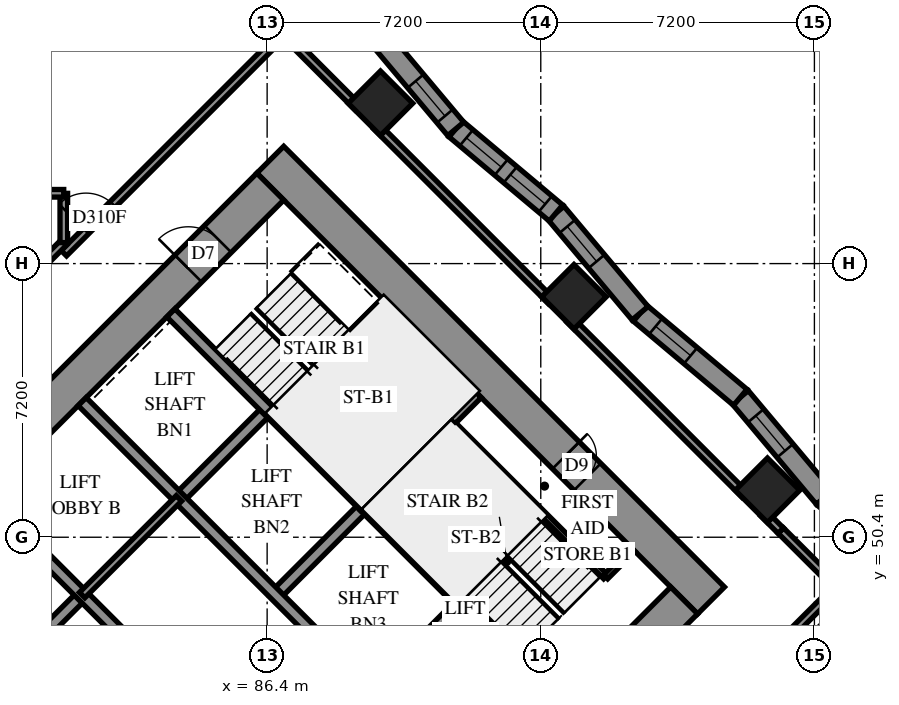
"""IFC4 building model, lengths in metres.
Left out: names, types, materials, properties, quantities, classifications, styles, units other than length and angle.
Written with IfcOpenShell. Run it as: python <this file> out.ifc"""

import sys

from ifc_helpers import new_model, si_unit, direction, frame, frame_2d, origin, origin_2d, place, context, subcontext, project, spatial, polyline, rectangle, outline, extrude, element, fill, save


model = new_model("IFC4")
c1 = context("Model", 3, precision=1e-05, world=origin(), true_north=direction((0.0, 1.0)))
c2 = subcontext(c1, "Body", "Model", "MODEL_VIEW")
j1 = project(units=[si_unit("LENGTHUNIT", "METRE"), si_unit("PLANEANGLEUNIT", "RADIAN")], contexts=[c1])
p1 = place(None, origin())
s1 = spatial("IfcSite", under=j1, at=p1, CompositionType="ELEMENT")
p2 = place(p1, origin())
s2 = spatial("IfcBuilding", under=s1, at=p2, CompositionType="ELEMENT")
p3 = place(p2, frame((0.0, 0.0, 27.0)))
s3 = spatial("IfcBuildingStorey", under=s2, at=p3, CompositionType="ELEMENT", Elevation=27.0)
for number, where, z_axis, x_axis in (
    (1, (89.382, 61.818, 0.0), (0.0, 0.0, 1.0), (0.707, -0.707, 0.0)),
    (2, (94.474, 56.727, 0.0), (0.0, 0.0, 1.0), (0.707, -0.707, 0.0)),
    (3, (99.565, 51.635, 0.0), (0.0, 0.0, 1.0), (0.707, -0.707, 0.0)),
):
    element("IfcColumn", number, at=place(p3, frame(where, z_axis=z_axis, x_axis=x_axis)), inside=s3, PredefinedType="COLUMN", context=c2, shape_type="SweptSolid", body=[
        extrude(rectangle(XDim=1.2, YDim=1.2, at=origin_2d()), origin(), (0.0, 0.0, 1.0), 3.1),
    ])
p4 = place(p3, frame((75.594, 49.443, -0.3), z_axis=(0.0, 0.0, 1.0), x_axis=(0.7071037324, -0.70710983, 0.0)))
e4 = element("IfcWall", 4, at=p4, inside=s3, PredefinedType="SHEAR", context=c2, shape_type="SweptSolid", body=[
    extrude(rectangle(XDim=16.4, YDim=1.0, at=frame_2d((8.2, 0.0))), origin(), (0.0, 0.0, 1.0), 2.7),
])
p5 = place(p3, frame((86.483, 60.333, -0.3), z_axis=(0.0, 0.0, 1.0), x_axis=(0.70710983, -0.7071037324, 0.0)))
e5 = element("IfcWall", 5, at=p5, inside=s3, PredefinedType="SHEAR", context=c2, shape_type="SweptSolid", body=[
    extrude(rectangle(XDim=16.4, YDim=1.0, at=frame_2d((8.2, 0.0))), origin(), (0.0, 0.0, 1.0), 2.7),
])
p6 = place(p5, frame((11.0, 0.0, 0.3)))
e6 = element("IfcOpeningElement", 6, at=p6, cuts=e5, PredefinedType="OPENING", context=c2, shape_type="SweptSolid", body=[
    extrude(rectangle(XDim=0.8, YDim=2.1, at=frame_2d((0.4, 1.05))), frame((0.0, 0.51, 0.0), z_axis=(0.0, -1.0, 0.0), x_axis=(1.0, 0.0, 0.0)), (0.0, 0.0, 1.0), 1.02),
])
p7 = place(p3, frame((76.301, 49.443, -0.3), z_axis=(0.0, 0.0, 1.0), x_axis=(0.7071067812, 0.7071067812, 0.0)))
e7 = element("IfcWall", 7, at=p7, inside=s3, PredefinedType="SHEAR", context=c2, shape_type="SweptSolid", body=[
    extrude(rectangle(XDim=14.4, YDim=1.0, at=frame_2d((7.2, 0.0))), origin(), (0.0, 0.0, 1.0), 2.7),
])
p8 = place(p7, frame((4.55, 0.0, 0.3)))
e8 = element("IfcOpeningElement", 8, at=p8, cuts=e7, PredefinedType="OPENING", context=c2, shape_type="SweptSolid", body=[
    extrude(rectangle(XDim=1.1, YDim=2.1, at=frame_2d((0.55, 1.05))), frame((0.0, 0.51, 0.0), z_axis=(0.0, -1.0, 0.0), x_axis=(1.0, 0.0, 0.0)), (0.0, 0.0, 1.0), 1.02),
])
p9 = place(p7, frame((11.35, 0.0, 0.3)))
e9 = element("IfcOpeningElement", 9, at=p9, cuts=e7, PredefinedType="OPENING", context=c2, shape_type="SweptSolid", body=[
    extrude(rectangle(XDim=1.1, YDim=2.1, at=frame_2d((0.55, 1.05))), frame((0.0, 0.51, 0.0), z_axis=(0.0, -1.0, 0.0), x_axis=(1.0, 0.0, 0.0)), (0.0, 0.0, 1.0), 1.02),
])
p10 = place(p3, frame((87.19, 38.554, -0.3), z_axis=(0.0, 0.0, 1.0), x_axis=(0.707103309, 0.7071102534, 0.0)))
e10 = element("IfcWall", 10, at=p10, inside=s3, PredefinedType="SHEAR", context=c2, shape_type="SweptSolid", body=[
    extrude(rectangle(XDim=14.4, YDim=1.0, at=frame_2d((7.2, 0.0))), origin(), (0.0, 0.0, 1.0), 2.7),
])
p11 = place(p10, frame((4.55, 0.0, 0.3)))
e11 = element("IfcOpeningElement", 11, at=p11, cuts=e10, PredefinedType="OPENING", context=c2, shape_type="SweptSolid", body=[
    extrude(rectangle(XDim=1.1, YDim=2.1, at=frame_2d((0.55, 1.05))), frame((0.0, 0.51, 0.0), z_axis=(0.0, -1.0, 0.0), x_axis=(1.0, 0.0, 0.0)), (0.0, 0.0, 1.0), 1.02),
])
p12 = place(p10, frame((11.35, 0.0, 0.3)))
e12 = element("IfcOpeningElement", 12, at=p12, cuts=e10, PredefinedType="OPENING", context=c2, shape_type="SweptSolid", body=[
    extrude(rectangle(XDim=1.1, YDim=2.1, at=frame_2d((0.55, 1.05))), frame((0.0, 0.51, 0.0), z_axis=(0.0, -1.0, 0.0), x_axis=(1.0, 0.0, 0.0)), (0.0, 0.0, 1.0), 1.02),
])
for number, where, z_axis, x_axis in (
    (13, (79.2, 46.544, 0.0), (0.0, 0.0, 1.0), (0.707, 0.707, 0.0)),
    (14, (84.079, 51.423, 0.0), (0.0, 0.0, 1.0), (0.707, 0.707, 0.0)),
):
    element("IfcWall", number, at=place(p3, frame(where, z_axis=z_axis, x_axis=x_axis)), inside=s3, PredefinedType="SOLIDWALL", context=c2, shape_type="SweptSolid", body=[
        extrude(rectangle(XDim=3.3, YDim=0.3, at=frame_2d((1.65, 0.0))), origin(), (0.0, 0.0, 1.0), 3.1),
    ])
for number, where, z_axis, x_axis in (
    (15, (86.625, 48.878, 0.0), (0.0, 0.0, 1.0), (0.707, 0.707, 0.0)),
    (16, (89.17, 46.332, 0.0), (0.0, 0.0, 1.0), (0.707, 0.707, 0.0)),
):
    element("IfcWall", number, at=place(p3, frame(where, z_axis=z_axis, x_axis=x_axis)), inside=s3, PredefinedType="SOLIDWALL", context=c2, shape_type="SweptSolid", body=[
        extrude(rectangle(XDim=3.3, YDim=0.3, at=frame_2d((1.65, 0.0))), origin(), (0.0, 0.0, 1.0), 3.1),
    ])
p13 = place(p3, frame((78.988, 51.423, 0.0), z_axis=(0.0, 0.0, 1.0), x_axis=(0.7071067812, -0.7071067812, 0.0)))
e17 = element("IfcWall", 17, at=p13, inside=s3, PredefinedType="SOLIDWALL", context=c2, shape_type="SweptSolid", body=[
    extrude(rectangle(XDim=14.4, YDim=0.3, at=frame_2d((7.2, 0.0))), origin(), (0.0, 0.0, 1.0), 3.1),
])
p14 = place(p13, frame((1.25, 0.0, 0.0)))
e18 = element("IfcOpeningElement", 18, at=p14, cuts=e17, PredefinedType="OPENING", context=c2, shape_type="SweptSolid", body=[
    extrude(rectangle(XDim=1.1, YDim=2.1, at=frame_2d((0.55, 1.05))), frame((0.0, 0.16, 0.0), z_axis=(0.0, -1.0, 0.0), x_axis=(1.0, 0.0, 0.0)), (0.0, 0.0, 1.0), 0.32),
])
p15 = place(p13, frame((4.85, 0.0, 0.0)))
e19 = element("IfcOpeningElement", 19, at=p15, cuts=e17, PredefinedType="OPENING", context=c2, shape_type="SweptSolid", body=[
    extrude(rectangle(XDim=1.1, YDim=2.1, at=frame_2d((0.55, 1.05))), frame((0.0, 0.16, 0.0), z_axis=(0.0, -1.0, 0.0), x_axis=(1.0, 0.0, 0.0)), (0.0, 0.0, 1.0), 0.32),
])
p16 = place(p13, frame((8.45, 0.0, 0.0)))
e20 = element("IfcOpeningElement", 20, at=p16, cuts=e17, PredefinedType="OPENING", context=c2, shape_type="SweptSolid", body=[
    extrude(rectangle(XDim=1.1, YDim=2.1, at=frame_2d((0.55, 1.05))), frame((0.0, 0.16, 0.0), z_axis=(0.0, -1.0, 0.0), x_axis=(1.0, 0.0, 0.0)), (0.0, 0.0, 1.0), 0.32),
])
p17 = place(p13, frame((12.05, 0.0, 0.0)))
e21 = element("IfcOpeningElement", 21, at=p17, cuts=e17, PredefinedType="OPENING", context=c2, shape_type="SweptSolid", body=[
    extrude(rectangle(XDim=1.1, YDim=2.1, at=frame_2d((0.55, 1.05))), frame((0.0, 0.16, 0.0), z_axis=(0.0, -1.0, 0.0), x_axis=(1.0, 0.0, 0.0)), (0.0, 0.0, 1.0), 0.32),
])
p18 = place(p3, frame((81.534, 53.969, 0.0), z_axis=(0.0, 0.0, 1.0), x_axis=(0.707103309, -0.7071102534, 0.0)))
e22 = element("IfcWall", 22, at=p18, inside=s3, PredefinedType="SOLIDWALL", context=c2, shape_type="SweptSolid", body=[
    extrude(rectangle(XDim=14.4, YDim=0.3, at=frame_2d((7.2, 0.0))), origin(), (0.0, 0.0, 1.0), 3.1),
])
p19 = place(p18, frame((12.05, 0.0, 0.0)))
e23 = element("IfcOpeningElement", 23, at=p19, cuts=e22, PredefinedType="OPENING", context=c2, shape_type="SweptSolid", body=[
    extrude(rectangle(XDim=1.1, YDim=2.1, at=frame_2d((0.55, 1.05))), frame((0.0, 0.16, 0.0), z_axis=(0.0, -1.0, 0.0), x_axis=(1.0, 0.0, 0.0)), (0.0, 0.0, 1.0), 0.32),
])
for number, where, z_axis, x_axis in (
    (24, (83.867, 56.302, 0.0), (0.0, 0.0, 1.0), (0.707, -0.707, 0.0)),
    (25, (88.958, 51.211, 0.0), (0.0, 0.0, 1.0), (0.707, -0.707, 0.0)),
):
    element("IfcWall", number, at=place(p3, frame(where, z_axis=z_axis, x_axis=x_axis)), inside=s3, PredefinedType="SOLIDWALL", context=c2, shape_type="SweptSolid", body=[
        extrude(rectangle(XDim=7.2, YDim=0.3, at=frame_2d((3.6, 0.0))), origin(), (0.0, 0.0, 1.0), 3.1),
    ])
p20 = place(p3, frame((88.958, 51.211, 0.0), z_axis=(0.0, 0.0, 1.0), x_axis=(0.7071067812, 0.7071067812, 0.0)))
e26 = element("IfcWall", 26, at=p20, inside=s3, PredefinedType="SOLIDWALL", context=c2, shape_type="SweptSolid", body=[
    extrude(rectangle(XDim=4.2, YDim=0.3, at=frame_2d((2.1, 0.0))), origin(), (0.0, 0.0, 1.0), 3.1),
])
p21 = place(p3, frame((103.7, 49.231, 0.0), z_axis=(0.0, 0.0, 1.0), x_axis=(-0.7660429609, 0.6427893761, 0.0)))
e27 = element("IfcWall", 27, at=p21, inside=s3, PredefinedType="SOLIDWALL", context=c2, shape_type="SweptSolid", body=[
    extrude(outline(polyline([(-0.024, -0.275), (3.418, -0.275), (3.466, 0.275), (0.024, 0.275), (-0.024, -0.275)])), origin(), (0.0, 0.0, 1.0), 3.1),
])
p22 = place(p21, frame((1.535, 0.0, 0.5)))
e28 = element("IfcOpeningElement", 28, at=p22, cuts=e27, PredefinedType="OPENING", context=c2, shape_type="SweptSolid", body=[
    extrude(rectangle(XDim=1.2, YDim=2.45, at=frame_2d((0.6, 1.225))), frame((0.0, 0.285, 0.0), z_axis=(0.0, -1.0, 0.0), x_axis=(1.0, 0.0, 0.0)), (0.0, 0.0, 1.0), 0.57),
])
p23 = place(p3, frame((101.063, 51.444, 0.0), z_axis=(0.0, 0.0, 1.0), x_axis=(-0.6428036801, 0.7660309582, 0.0)))
e29 = element("IfcWall", 29, at=p23, inside=s3, PredefinedType="SOLIDWALL", context=c2, shape_type="SweptSolid", body=[
    extrude(outline(polyline([(0.024, -0.275), (3.466, -0.275), (3.418, 0.275), (-0.024, 0.275), (0.024, -0.275)])), origin(), (0.0, 0.0, 1.0), 3.1),
])
p24 = place(p23, frame((1.609, 0.0, 0.5)))
e30 = element("IfcOpeningElement", 30, at=p24, cuts=e29, PredefinedType="OPENING", context=c2, shape_type="SweptSolid", body=[
    extrude(rectangle(XDim=1.2, YDim=2.45, at=frame_2d((0.6, 1.225))), frame((0.0, 0.285, 0.0), z_axis=(0.0, -1.0, 0.0), x_axis=(1.0, 0.0, 0.0)), (0.0, 0.0, 1.0), 0.57),
])
p25 = place(p3, frame((98.85, 54.081, 0.0), z_axis=(0.0, 0.0, 1.0), x_axis=(-0.7660309582, 0.6428036801, 0.0)))
e31 = element("IfcWall", 31, at=p25, inside=s3, PredefinedType="SOLIDWALL", context=c2, shape_type="SweptSolid", body=[
    extrude(outline(polyline([(-0.024, -0.275), (3.418, -0.275), (3.466, 0.275), (0.024, 0.275), (-0.024, -0.275)])), origin(), (0.0, 0.0, 1.0), 3.1),
])
p26 = place(p25, frame((1.706, 0.0, 0.5)))
e32 = element("IfcOpeningElement", 32, at=p26, cuts=e31, PredefinedType="OPENING", context=c2, shape_type="SweptSolid", body=[
    extrude(rectangle(XDim=1.2, YDim=2.45, at=frame_2d((0.6, 1.225))), frame((0.0, 0.285, 0.0), z_axis=(0.0, -1.0, 0.0), x_axis=(1.0, 0.0, 0.0)), (0.0, 0.0, 1.0), 0.57),
])
p27 = place(p3, frame((96.213, 56.294, 0.0), z_axis=(0.0, 0.0, 1.0), x_axis=(-0.6427893761, 0.7660429609, 0.0)))
e33 = element("IfcWall", 33, at=p27, inside=s3, PredefinedType="SOLIDWALL", context=c2, shape_type="SweptSolid", body=[
    extrude(outline(polyline([(0.024, -0.275), (3.466, -0.275), (3.418, 0.275), (-0.024, 0.275), (0.024, -0.275)])), origin(), (0.0, 0.0, 1.0), 3.1),
])
p28 = place(p27, frame((1.78, 0.0, 0.5)))
e34 = element("IfcOpeningElement", 34, at=p28, cuts=e33, PredefinedType="OPENING", context=c2, shape_type="SweptSolid", body=[
    extrude(rectangle(XDim=1.2, YDim=2.45, at=frame_2d((0.6, 1.225))), frame((0.0, 0.285, 0.0), z_axis=(0.0, -1.0, 0.0), x_axis=(1.0, 0.0, 0.0)), (0.0, 0.0, 1.0), 0.57),
])
p29 = place(p3, frame((94.0, 58.931, 0.0), z_axis=(0.0, 0.0, 1.0), x_axis=(-0.7660429609, 0.6427893761, 0.0)))
e35 = element("IfcWall", 35, at=p29, inside=s3, PredefinedType="SOLIDWALL", context=c2, shape_type="SweptSolid", body=[
    extrude(outline(polyline([(-0.024, -0.275), (3.418, -0.275), (3.466, 0.275), (0.024, 0.275), (-0.024, -0.275)])), origin(), (0.0, 0.0, 1.0), 3.1),
])
p30 = place(p29, frame((0.368, 0.0, 0.5)))
e36 = element("IfcOpeningElement", 36, at=p30, cuts=e35, PredefinedType="OPENING", context=c2, shape_type="SweptSolid", body=[
    extrude(rectangle(XDim=1.2, YDim=2.45, at=frame_2d((0.6, 1.225))), frame((0.0, 0.285, 0.0), z_axis=(0.0, -1.0, 0.0), x_axis=(1.0, 0.0, 0.0)), (0.0, 0.0, 1.0), 0.57),
])
p31 = place(p29, frame((1.878, 0.0, 0.5)))
e37 = element("IfcOpeningElement", 37, at=p31, cuts=e35, PredefinedType="OPENING", context=c2, shape_type="SweptSolid", body=[
    extrude(rectangle(XDim=1.2, YDim=2.45, at=frame_2d((0.6, 1.225))), frame((0.0, 0.285, 0.0), z_axis=(0.0, -1.0, 0.0), x_axis=(1.0, 0.0, 0.0)), (0.0, 0.0, 1.0), 0.57),
])
p32 = place(p3, frame((91.363, 61.144, 0.0), z_axis=(0.0, 0.0, 1.0), x_axis=(-0.6428036801, 0.7660309582, 0.0)))
e38 = element("IfcWall", 38, at=p32, inside=s3, PredefinedType="SOLIDWALL", context=c2, shape_type="SweptSolid", body=[
    extrude(outline(polyline([(0.024, -0.275), (3.466, -0.275), (3.418, 0.275), (-0.024, 0.275), (0.024, -0.275)])), origin(), (0.0, 0.0, 1.0), 3.1),
])
p33 = place(p32, frame((0.442, 0.0, 0.5)))
e39 = element("IfcOpeningElement", 39, at=p33, cuts=e38, PredefinedType="OPENING", context=c2, shape_type="SweptSolid", body=[
    extrude(rectangle(XDim=1.2, YDim=2.45, at=frame_2d((0.6, 1.225))), frame((0.0, 0.285, 0.0), z_axis=(0.0, -1.0, 0.0), x_axis=(1.0, 0.0, 0.0)), (0.0, 0.0, 1.0), 0.57),
])
p34 = place(p3, frame((91.313, 53.354, 0.0), z_axis=(0.0, 0.0, 1.0), x_axis=(0.7071067812, -0.7071067812, 0.0)))
e40 = element("IfcWall", 40, at=p34, inside=s3, PredefinedType="PARTITIONING", context=c2, shape_type="SweptSolid", body=[
    extrude(rectangle(XDim=5.65, YDim=0.15, at=frame_2d((2.825, 0.0))), origin(), (0.0, 0.0, 1.0), 3.1),
])
p35 = place(p3, frame((95.308, 49.358, 0.0), z_axis=(0.0, 0.0, 1.0), x_axis=(0.70705776, 0.707155799, 0.0)))
e41 = element("IfcWall", 41, at=p35, inside=s3, PredefinedType="PARTITIONING", context=c2, shape_type="SweptSolid", body=[
    extrude(rectangle(XDim=1.02, YDim=0.15, at=frame_2d((0.51, 0.0))), origin(), (0.0, 0.0, 1.0), 3.1),
])
p36 = place(p3, frame((81.534, 48.878, 0.0), z_axis=(0.0, 0.0, 1.0), x_axis=(0.707092892, 0.7071206701, 0.0)))
e42 = element("IfcWall", 42, at=p36, inside=s3, PredefinedType="PARTITIONING", context=c2, shape_type="SweptSolid", body=[
    extrude(rectangle(XDim=3.6, YDim=0.2, at=frame_2d((1.8, 0.0))), origin(), (0.0, 0.0, 1.0), 3.1),
])
p37 = place(p3, frame((94.901, 42.583, 0.0), z_axis=(0.0, 0.0, 1.0), x_axis=(0.7072154749, 0.7069980708, 0.0)))
e43 = element("IfcWall", 43, at=p37, inside=s3, PredefinedType="PARTITIONING", context=c2, shape_type="SweptSolid", body=[
    extrude(rectangle(XDim=9.2, YDim=0.2, at=frame_2d((4.6, 0.0))), origin(), (0.0, 0.0, 1.0), 3.1),
])
p38 = place(p3, frame((81.052, 57.873, 0.0), z_axis=(0.0, 0.0, 1.0), x_axis=(0.7071067812, 0.7071067812, 0.0)))
e44 = element("IfcWall", 44, at=p38, inside=s3, PredefinedType="PARTITIONING", context=c2, shape_type="SweptSolid", body=[
    extrude(rectangle(XDim=8.18, YDim=0.2, at=frame_2d((4.09, 0.0))), origin(), (0.0, 0.0, 1.0), 3.1),
])
p39 = place(p38, frame((0.823, 0.0, 0.0)))
e45 = element("IfcOpeningElement", 45, at=p39, cuts=e44, PredefinedType="OPENING", context=c2, shape_type="SweptSolid", body=[
    extrude(rectangle(XDim=1.0, YDim=2.1, at=frame_2d((0.5, 1.05))), frame((0.0, 0.11, 0.0), z_axis=(0.0, -1.0, 0.0), x_axis=(1.0, 0.0, 0.0)), (0.0, 0.0, 1.0), 0.22),
])
p40 = place(p3, frame((96.947, 43.929, 0.0), z_axis=(0.0, 0.0, 1.0), x_axis=(0.7071067812, 0.7071067812, 0.0)))
e46 = element("IfcWall", 46, at=p40, inside=s3, PredefinedType="PARTITIONING", context=c2, shape_type="SweptSolid", body=[
    extrude(rectangle(XDim=8.159, YDim=0.2, at=frame_2d((4.079, 0.0))), origin(), (0.0, 0.0, 1.0), 3.1),
])
p41 = place(p3, frame((89.271, 61.215, 0.0), z_axis=(0.0, 0.0, 1.0), x_axis=(0.7071067812, -0.7071067812, 0.0)))
e47 = element("IfcWall", 47, at=p41, inside=s3, PredefinedType="PARTITIONING", context=c2, shape_type="SweptSolid", body=[
    extrude(rectangle(XDim=6.505, YDim=0.2, at=frame_2d((3.253, 0.0))), origin(), (0.0, 0.0, 1.0), 3.1),
])
p42 = place(p3, frame((94.363, 56.123, 0.0), z_axis=(0.0, 0.0, 1.0), x_axis=(0.7071067812, -0.7071067812, 0.0)))
e48 = element("IfcWall", 48, at=p42, inside=s3, PredefinedType="PARTITIONING", context=c2, shape_type="SweptSolid", body=[
    extrude(rectangle(XDim=6.503, YDim=0.2, at=frame_2d((3.251, 0.0))), origin(), (0.0, 0.0, 1.0), 3.1),
])
p43 = place(p3, frame((86.841, 63.659, 0.0), z_axis=(0.0, 0.0, 1.0), x_axis=(0.7067795096, -0.7074339014, 0.0)))
e49 = element("IfcWall", 49, at=p43, inside=s3, PredefinedType="PARTITIONING", context=c2, shape_type="SweptSolid", body=[
    extrude(rectangle(XDim=2.751, YDim=0.2, at=frame_2d((1.375, 0.0))), origin(), (0.0, 0.0, 1.0), 3.1),
])
p44 = place(p3, frame((99.918, 50.574, 0.0), z_axis=(0.0, 0.0, 1.0), x_axis=(0.7075827869, -0.7066304548, 0.0)))
e50 = element("IfcWall", 50, at=p44, inside=s3, PredefinedType="PARTITIONING", context=c2, shape_type="SweptSolid", body=[
    extrude(rectangle(XDim=2.1, YDim=0.2, at=frame_2d((1.05, 0.0))), origin(), (0.0, 0.0, 1.0), 3.1),
])
p45 = place(p3, frame((79.801, 56.905, 0.0), z_axis=(0.0, 0.0, 1.0), x_axis=(0.7071067812, 0.7071067812, 0.0)))
e51 = element("IfcWall", 51, at=p45, inside=s3, PredefinedType="PARTITIONING", context=c2, shape_type="SweptSolid", body=[
    extrude(rectangle(XDim=1.765, YDim=0.2, at=frame_2d((0.882, 0.0))), origin(), (0.0, 0.0, 1.0), 3.1),
])
p46 = place(p3, frame((81.05, 58.152, 0.0), z_axis=(0.0, 0.0, 1.0), x_axis=(0.0, 1.0, 0.0)))
e52 = element("IfcWall", 52, at=p46, inside=s3, PredefinedType="PARTITIONING", context=c2, shape_type="SweptSolid", body=[
    extrude(rectangle(XDim=1.296, YDim=0.2, at=frame_2d((0.648, 0.0))), origin(), (0.0, 0.0, 1.0), 3.1),
])
p47 = place(p3, frame((79.8, 59.45, 0.0), z_axis=(0.0, 0.0, 1.0), x_axis=(1.0, 0.0, 0.0)))
e53 = element("IfcWall", 53, at=p47, inside=s3, PredefinedType="PARTITIONING", context=c2, shape_type="SweptSolid", body=[
    extrude(rectangle(XDim=1.248, YDim=0.2, at=frame_2d((0.624, 0.0))), origin(), (0.0, 0.0, 1.0), 3.1),
])
p48 = place(p3, frame((99.453, 51.033, 0.0), z_axis=(0.0, 0.0, 1.0), x_axis=(0.7071067812, -0.7071067812, 0.0)))
e54 = element("IfcWall", 54, at=p48, inside=s3, PredefinedType="PARTITIONING", context=c2, shape_type="SweptSolid", body=[
    extrude(rectangle(XDim=0.653, YDim=0.2, at=frame_2d((0.327, 0.0))), origin(), (0.0, 0.0, 1.0), 3.1),
])
p49 = place(p24, origin())
e55 = element("IfcWindow", 55, at=p49, inside=s3, PartitioningType="SINGLE_PANEL", PredefinedType="WINDOW", context=c2, shape_type="SweptSolid", body=[
    extrude(rectangle(XDim=1.2, YDim=2.45, at=frame_2d((0.6, 1.225))), frame((0.0, 0.155, 0.0), z_axis=(0.0, -1.0, 0.0), x_axis=(1.0, 0.0, 0.0)), (0.0, 0.0, 1.0), 0.06),
])
fill(e30, e55)
p50 = place(p26, origin())
e56 = element("IfcWindow", 56, at=p50, inside=s3, PartitioningType="SINGLE_PANEL", PredefinedType="WINDOW", context=c2, shape_type="SweptSolid", body=[
    extrude(rectangle(XDim=1.2, YDim=2.45, at=frame_2d((0.6, 1.225))), frame((0.0, 0.155, 0.0), z_axis=(0.0, -1.0, 0.0), x_axis=(1.0, 0.0, 0.0)), (0.0, 0.0, 1.0), 0.06),
])
fill(e32, e56)
p51 = place(p28, origin())
e57 = element("IfcWindow", 57, at=p51, inside=s3, PartitioningType="SINGLE_PANEL", PredefinedType="WINDOW", context=c2, shape_type="SweptSolid", body=[
    extrude(rectangle(XDim=1.2, YDim=2.45, at=frame_2d((0.6, 1.225))), frame((0.0, 0.155, 0.0), z_axis=(0.0, -1.0, 0.0), x_axis=(1.0, 0.0, 0.0)), (0.0, 0.0, 1.0), 0.06),
])
fill(e34, e57)
p52 = place(p30, origin())
e58 = element("IfcWindow", 58, at=p52, inside=s3, PartitioningType="SINGLE_PANEL", PredefinedType="WINDOW", context=c2, shape_type="SweptSolid", body=[
    extrude(rectangle(XDim=1.2, YDim=2.45, at=frame_2d((0.6, 1.225))), frame((0.0, 0.155, 0.0), z_axis=(0.0, -1.0, 0.0), x_axis=(1.0, 0.0, 0.0)), (0.0, 0.0, 1.0), 0.06),
])
fill(e36, e58)
p53 = place(p31, origin())
e59 = element("IfcWindow", 59, at=p53, inside=s3, PartitioningType="SINGLE_PANEL", PredefinedType="WINDOW", context=c2, shape_type="SweptSolid", body=[
    extrude(rectangle(XDim=1.2, YDim=2.45, at=frame_2d((0.6, 1.225))), frame((0.0, 0.155, 0.0), z_axis=(0.0, -1.0, 0.0), x_axis=(1.0, 0.0, 0.0)), (0.0, 0.0, 1.0), 0.06),
])
fill(e37, e59)
p54 = place(p33, origin())
e60 = element("IfcWindow", 60, at=p54, inside=s3, PartitioningType="SINGLE_PANEL", PredefinedType="WINDOW", context=c2, shape_type="SweptSolid", body=[
    extrude(rectangle(XDim=1.2, YDim=2.45, at=frame_2d((0.6, 1.225))), frame((0.0, 0.155, 0.0), z_axis=(0.0, -1.0, 0.0), x_axis=(1.0, 0.0, 0.0)), (0.0, 0.0, 1.0), 0.06),
])
fill(e39, e60)
p55 = place(p6, origin())
e61 = element("IfcDoor", 61, at=p55, inside=s3, OperationType="SINGLE_SWING_RIGHT", PredefinedType="DOOR", context=c2, shape_type="SweptSolid", body=[
    extrude(rectangle(XDim=0.8, YDim=2.1, at=frame_2d((0.4, 1.05))), frame((0.0, -0.44, 0.0), z_axis=(0.0, -1.0, 0.0), x_axis=(1.0, 0.0, 0.0)), (0.0, 0.0, 1.0), 0.05),
])
fill(e6, e61)
p56 = place(p9, origin())
e62 = element("IfcDoor", 62, at=p56, inside=s3, OperationType="SINGLE_SWING_LEFT", PredefinedType="DOOR", context=c2, shape_type="SweptSolid", body=[
    extrude(rectangle(XDim=1.1, YDim=2.1, at=frame_2d((0.55, 1.05))), frame((0.0, 0.025, 0.0), z_axis=(0.0, -1.0, 0.0), x_axis=(1.0, 0.0, 0.0)), (0.0, 0.0, 1.0), 0.05),
])
fill(e9, e62)
p57 = place(p39, origin())
e63 = element("IfcDoor", 63, at=p57, inside=s3, OperationType="SINGLE_SWING_RIGHT", PredefinedType="DOOR", context=c2, shape_type="SweptSolid", body=[
    extrude(rectangle(XDim=1.0, YDim=2.1, at=frame_2d((0.5, 1.05))), frame((0.0, 0.025, 0.0), z_axis=(0.0, -1.0, 0.0), x_axis=(1.0, 0.0, 0.0)), (0.0, 0.0, 1.0), 0.05),
])
fill(e45, e63)
save(model, sys.argv[1])
